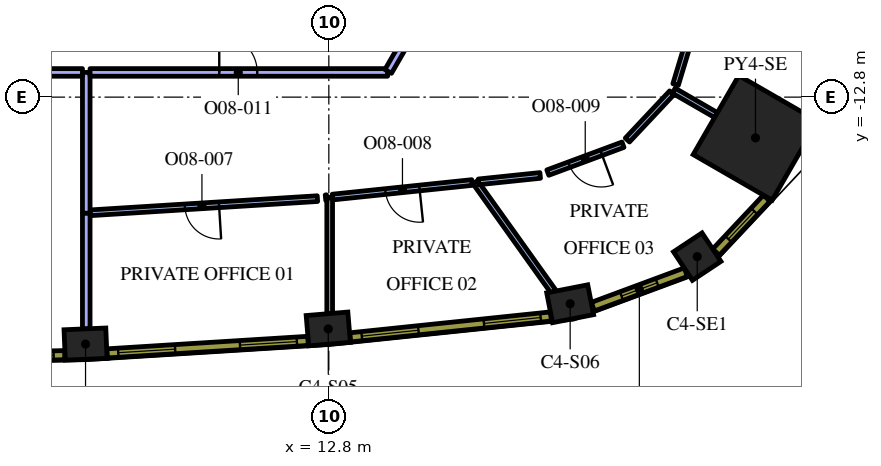
"""IFC4 building model, lengths in metres.
Left out: names, types, materials, properties, quantities, classifications, styles, units other than length and angle.
Written with IfcOpenShell. Run it as: python <this file> out.ifc"""

import sys

from ifc_helpers import new_model, si_unit, direction, frame, frame_2d, origin, origin_2d, place, context, subcontext, project, spatial, rectangle, extrude, element, fill, save


model = new_model("IFC4")
c1 = context("Model", 3, precision=1e-05, world=origin(), true_north=direction((0.0, 1.0)))
c2 = subcontext(c1, "Body", "Model", "MODEL_VIEW")
j1 = project(units=[si_unit("LENGTHUNIT", "METRE"), si_unit("PLANEANGLEUNIT", "RADIAN")], contexts=[c1])
p1 = place(None, origin())
s1 = spatial("IfcSite", under=j1, at=p1, CompositionType="ELEMENT")
p2 = place(p1, origin())
s2 = spatial("IfcBuilding", under=s1, at=p2, CompositionType="ELEMENT")
p3 = place(p2, frame((0.0, 0.0, 231.0)))
s3 = spatial("IfcBuildingStorey", under=s2, at=p3, CompositionType="ELEMENT", Elevation=231.0)
p4 = place(p3, frame((24.027, -13.872, 0.0), z_axis=(0.0, 0.0, 1.0), x_axis=(0.866025403784, -0.5, 0.0)))
e1 = element("IfcColumn", 1, at=p4, inside=s3, PredefinedType="COLUMN", context=c2, shape_type="SweptSolid", body=[
    extrude(rectangle(XDim=2.4, YDim=2.4, at=origin_2d()), origin(), (0.0, 0.0, 1.0), 4.2),
])
for number, where, z_axis, x_axis in (
    (2, (6.398, -19.298, 0.0), (0.0, 0.0, 1.0), (0.999, 0.041, 0.0)),
    (3, (12.785, -18.9, 0.0), (0.0, 0.0, 1.0), (0.997, 0.083, 0.0)),
    (4, (19.15, -18.237, 0.0), (0.0, 0.0, 1.0), (0.981, 0.192, 0.0)),
):
    element("IfcColumn", number, at=place(p3, frame(where, z_axis=z_axis, x_axis=x_axis)), inside=s3, PredefinedType="COLUMN", context=c2, shape_type="SweptSolid", body=[
        extrude(rectangle(XDim=1.1, YDim=0.8, at=origin_2d()), origin(), (0.0, 0.0, 1.0), 4.2),
    ])
p5 = place(p3, frame((22.494, -16.997, 0.0), z_axis=(0.0, 0.0, 1.0), x_axis=(0.833238868178, 0.552913183563, 0.0)))
e5 = element("IfcColumn", 5, at=p5, inside=s3, PredefinedType="COLUMN", context=c2, shape_type="SweptSolid", body=[
    extrude(rectangle(XDim=0.9, YDim=0.9, at=origin_2d()), origin(), (0.0, 0.0, 1.0), 4.2),
])
p6 = place(p3, frame((6.417, -15.846, 0.0), z_axis=(0.0, 0.0, 1.0), x_axis=(0.0, -1.0, 0.0)))
e6 = element("IfcWall", 6, at=p6, inside=s3, PredefinedType="PARTITIONING", context=c2, shape_type="SweptSolid", body=[
    extrude(rectangle(XDim=3.051, YDim=0.2, at=frame_2d((1.525, 0.0))), origin(), (0.0, 0.0, 1.0), 3.45),
])
p7 = place(p3, frame((6.417, -12.15, 0.0), z_axis=(0.0, 0.0, 1.0), x_axis=(0.0, -1.0, 0.0)))
e7 = element("IfcWall", 7, at=p7, inside=s3, PredefinedType="PARTITIONING", context=c2, shape_type="SweptSolid", body=[
    extrude(rectangle(XDim=3.704, YDim=0.2, at=frame_2d((1.852, 0.0))), origin(), (0.0, 0.0, 1.0), 3.45),
])
p8 = place(p3, frame((4.53, -12.15, 0.0), z_axis=(0.0, 0.0, 1.0), x_axis=(1.0, 0.0, 0.0)))
e8 = element("IfcWall", 8, at=p8, inside=s3, PredefinedType="PARTITIONING", context=c2, shape_type="SweptSolid", body=[
    extrude(rectangle(XDim=1.787, YDim=0.2, at=frame_2d((0.894, 0.0))), origin(), (0.0, 0.0, 1.0), 3.45),
])
p9 = place(p3, frame((12.823, -15.437, 0.0), z_axis=(0.0, 0.0, 1.0), x_axis=(0.0, -1.0, 0.0)))
e9 = element("IfcWall", 9, at=p9, inside=s3, PredefinedType="PARTITIONING", context=c2, shape_type="SweptSolid", body=[
    extrude(rectangle(XDim=3.058, YDim=0.15, at=frame_2d((1.529, 0.0))), origin(), (0.0, 0.0, 1.0), 3.45),
])
p10 = place(p3, frame((12.5, -15.471, 0.0), z_axis=(0.0, 0.0, 1.0), x_axis=(-0.998061916726, -0.0622286942, 0.0)))
e10 = element("IfcWall", 10, at=p10, inside=s3, PredefinedType="PARTITIONING", context=c2, shape_type="SweptSolid", body=[
    extrude(rectangle(XDim=5.995, YDim=0.15, at=frame_2d((2.998, 0.0))), origin(), (0.0, 0.0, 1.0), 3.45),
])
p11 = place(p10, frame((2.595, 0.0, 0.0)))
e11 = element("IfcOpeningElement", 11, at=p11, cuts=e10, PredefinedType="OPENING", context=c2, shape_type="SweptSolid", body=[
    extrude(rectangle(XDim=0.9, YDim=2.1, at=frame_2d((0.45, 1.05))), frame((0.0, 0.085, 0.0), z_axis=(0.0, -1.0, 0.0), x_axis=(1.0, 0.0, 0.0)), (0.0, 0.0, 1.0), 0.17),
])
p12 = place(p3, frame((12.713, -15.448, 0.0), z_axis=(0.0, 0.0, 1.0), x_axis=(0.995106821048, 0.098804932586, 0.0)))
e12 = element("IfcWall", 12, at=p12, inside=s3, PredefinedType="PARTITIONING", context=c2, shape_type="SweptSolid", body=[
    extrude(rectangle(XDim=0.035, YDim=0.15, at=frame_2d((0.017, 0.0))), origin(), (0.0, 0.0, 1.0), 3.45),
])
p13 = place(p3, frame((16.655, -15.038, 0.0), z_axis=(0.0, 0.0, 1.0), x_axis=(0.580996489012, -0.813906063226, 0.0)))
e13 = element("IfcWall", 13, at=p13, inside=s3, PredefinedType="PARTITIONING", context=c2, shape_type="SweptSolid", body=[
    extrude(rectangle(XDim=3.536, YDim=0.15, at=frame_2d((1.768, 0.0))), origin(), (0.0, 0.0, 1.0), 3.45),
])
p14 = place(p3, frame((16.569, -15.047, 0.0), z_axis=(0.0, 0.0, 1.0), x_axis=(-0.994621532294, -0.103576095197, 0.0)))
e14 = element("IfcWall", 14, at=p14, inside=s3, PredefinedType="PARTITIONING", context=c2, shape_type="SweptSolid", body=[
    extrude(rectangle(XDim=3.691, YDim=0.15, at=frame_2d((1.846, 0.0))), origin(), (0.0, 0.0, 1.0), 3.45),
])
p15 = place(p14, frame((1.391, 0.0, 0.0)))
e15 = element("IfcOpeningElement", 15, at=p15, cuts=e14, PredefinedType="OPENING", context=c2, shape_type="SweptSolid", body=[
    extrude(rectangle(XDim=0.9, YDim=2.1, at=frame_2d((0.45, 1.05))), frame((0.0, 0.085, 0.0), z_axis=(0.0, -1.0, 0.0), x_axis=(1.0, 0.0, 0.0)), (0.0, 0.0, 1.0), 0.17),
])
p16 = place(p3, frame((21.877, -12.63, 0.0), z_axis=(0.0, 0.0, 1.0), x_axis=(0.86599869919, -0.500046250861, 0.0)))
e16 = element("IfcWall", 16, at=p16, inside=s3, PredefinedType="PARTITIONING", context=c2, shape_type="SweptSolid", body=[
    extrude(rectangle(XDim=1.284, YDim=0.15, at=frame_2d((0.642, 0.0))), origin(), (0.0, 0.0, 1.0), 3.45),
])
p17 = place(p3, frame((16.74, -15.029, 0.0), z_axis=(0.0, 0.0, 1.0), x_axis=(0.994614871477, 0.103640037805, 0.0)))
e17 = element("IfcWall", 17, at=p17, inside=s3, PredefinedType="PARTITIONING", context=c2, shape_type="SweptSolid", body=[
    extrude(rectangle(XDim=1.63, YDim=0.15, at=frame_2d((0.815, 0.0))), origin(), (0.0, 0.0, 1.0), 3.45),
])
p18 = place(p3, frame((20.541, -14.052, 0.0), z_axis=(0.0, 0.0, 1.0), x_axis=(-0.937602119917, -0.347710029662, 0.0)))
e18 = element("IfcWall", 18, at=p18, inside=s3, PredefinedType="PARTITIONING", context=c2, shape_type="SweptSolid", body=[
    extrude(rectangle(XDim=2.11, YDim=0.15, at=frame_2d((1.055, 0.0))), origin(), (0.0, 0.0, 1.0), 3.45),
])
p19 = place(p18, frame((0.61, 0.0, 0.0)))
e19 = element("IfcOpeningElement", 19, at=p19, cuts=e18, PredefinedType="OPENING", context=c2, shape_type="SweptSolid", body=[
    extrude(rectangle(XDim=0.9, YDim=2.1, at=frame_2d((0.45, 1.05))), frame((0.0, 0.085, 0.0), z_axis=(0.0, -1.0, 0.0), x_axis=(1.0, 0.0, 0.0)), (0.0, 0.0, 1.0), 0.17),
])
p20 = place(p3, frame((20.656, -13.929, 0.0), z_axis=(0.0, 0.0, 1.0), x_axis=(0.684716940988, 0.728809104447, 0.0)))
e20 = element("IfcWall", 20, at=p20, inside=s3, PredefinedType="PARTITIONING", context=c2, shape_type="SweptSolid", body=[
    extrude(rectangle(XDim=1.705, YDim=0.15, at=frame_2d((0.853, 0.0))), origin(), (0.0, 0.0, 1.0), 3.45),
])
p21 = place(p3, frame((21.925, -12.469, 0.0), z_axis=(0.0, 0.0, 1.0), x_axis=(0.288767705809, 0.957399191603, 0.0)))
e21 = element("IfcWall", 21, at=p21, inside=s3, PredefinedType="PARTITIONING", context=c2, shape_type="SweptSolid", body=[
    extrude(rectangle(XDim=1.782, YDim=0.15, at=frame_2d((0.891, 0.0))), origin(), (0.0, 0.0, 1.0), 3.45),
])
p22 = place(p3, frame((6.517, -12.15, 0.0), z_axis=(0.0, 0.0, 1.0), x_axis=(1.0, 0.0, 0.0)))
e22 = element("IfcWall", 22, at=p22, inside=s3, PredefinedType="PARTITIONING", context=c2, shape_type="SweptSolid", body=[
    extrude(rectangle(XDim=7.83, YDim=0.2, at=frame_2d((3.915, 0.0))), origin(), (0.0, 0.0, 1.0), 3.45),
])
p23 = place(p22, frame((3.4, 0.0, 0.0)))
e23 = element("IfcOpeningElement", 23, at=p23, cuts=e22, PredefinedType="OPENING", context=c2, shape_type="SweptSolid", body=[
    extrude(rectangle(XDim=1.0, YDim=2.1, at=frame_2d((0.5, 1.05))), frame((0.0, 0.11, 0.0), z_axis=(0.0, -1.0, 0.0), x_axis=(1.0, 0.0, 0.0)), (0.0, 0.0, 1.0), 0.22),
])
p24 = place(p3, frame((14.362, -12.124, 0.0), z_axis=(0.0, 0.0, 1.0), x_axis=(0.500017005442, 0.866015585465, 0.0)))
e24 = element("IfcWall", 24, at=p24, inside=s3, PredefinedType="PARTITIONING", context=c2, shape_type="SweptSolid", body=[
    extrude(rectangle(XDim=6.338, YDim=0.2, at=frame_2d((3.169, 0.0))), origin(), (0.0, 0.0, 1.0), 3.45),
])
p25 = place(p3, frame((0.556, -19.699, 0.0), z_axis=(0.0, 0.0, 1.0), x_axis=(0.999784035184, 0.020781794712, 0.0)))
e25 = element("IfcWall", 25, at=p25, inside=s3, PredefinedType="SOLIDWALL", context=c2, shape_type="SweptSolid", body=[
    extrude(rectangle(XDim=5.298, YDim=0.24, at=frame_2d((2.649, 0.0))), origin(), (0.0, 0.0, 1.0), 3.95),
])
p26 = place(p25, frame((0.294, 0.0, 0.9)))
e26 = element("IfcOpeningElement", 26, at=p26, cuts=e25, PredefinedType="OPENING", context=c2, shape_type="SweptSolid", body=[
    extrude(rectangle(XDim=1.5, YDim=2.55, at=frame_2d((0.75, 1.275))), frame((0.0, 0.13, 0.0), z_axis=(0.0, -1.0, 0.0), x_axis=(1.0, 0.0, 0.0)), (0.0, 0.0, 1.0), 0.26),
])
p27 = place(p25, frame((3.504, 0.0, 0.9)))
e27 = element("IfcOpeningElement", 27, at=p27, cuts=e25, PredefinedType="OPENING", context=c2, shape_type="SweptSolid", body=[
    extrude(rectangle(XDim=1.5, YDim=2.55, at=frame_2d((0.75, 1.275))), frame((0.0, 0.13, 0.0), z_axis=(0.0, -1.0, 0.0), x_axis=(1.0, 0.0, 0.0)), (0.0, 0.0, 1.0), 0.26),
])
p28 = place(p3, frame((6.965, -19.543, 0.0), z_axis=(0.0, 0.0, 1.0), x_axis=(0.9980633213, 0.062206162685, 0.0)))
e28 = element("IfcWall", 28, at=p28, inside=s3, PredefinedType="SOLIDWALL", context=c2, shape_type="SweptSolid", body=[
    extrude(rectangle(XDim=5.298, YDim=0.24, at=frame_2d((2.649, 0.0))), origin(), (0.0, 0.0, 1.0), 3.95),
])
p29 = place(p28, frame((0.295, 0.0, 0.9)))
e29 = element("IfcOpeningElement", 29, at=p29, cuts=e28, PredefinedType="OPENING", context=c2, shape_type="SweptSolid", body=[
    extrude(rectangle(XDim=1.5, YDim=2.55, at=frame_2d((0.75, 1.275))), frame((0.0, 0.13, 0.0), z_axis=(0.0, -1.0, 0.0), x_axis=(1.0, 0.0, 0.0)), (0.0, 0.0, 1.0), 0.26),
])
p30 = place(p28, frame((3.504, 0.0, 0.9)))
e30 = element("IfcOpeningElement", 30, at=p30, cuts=e28, PredefinedType="OPENING", context=c2, shape_type="SweptSolid", body=[
    extrude(rectangle(XDim=1.5, YDim=2.55, at=frame_2d((0.75, 1.275))), frame((0.0, 0.13, 0.0), z_axis=(0.0, -1.0, 0.0), x_axis=(1.0, 0.0, 0.0)), (0.0, 0.0, 1.0), 0.26),
])
p31 = place(p3, frame((13.362, -19.121, 0.0), z_axis=(0.0, 0.0, 1.0), x_axis=(0.994621961215, 0.103571976272, 0.0)))
e31 = element("IfcWall", 31, at=p31, inside=s3, PredefinedType="SOLIDWALL", context=c2, shape_type="SweptSolid", body=[
    extrude(rectangle(XDim=5.311, YDim=0.24, at=frame_2d((2.655, 0.0))), origin(), (0.0, 0.0, 1.0), 3.95),
])
p32 = place(p31, frame((0.306, 0.0, 0.9)))
e32 = element("IfcOpeningElement", 32, at=p32, cuts=e31, PredefinedType="OPENING", context=c2, shape_type="SweptSolid", body=[
    extrude(rectangle(XDim=1.5, YDim=2.55, at=frame_2d((0.75, 1.275))), frame((0.0, 0.13, 0.0), z_axis=(0.0, -1.0, 0.0), x_axis=(1.0, 0.0, 0.0)), (0.0, 0.0, 1.0), 0.26),
])
p33 = place(p31, frame((3.539, 0.0, 0.9)))
e33 = element("IfcOpeningElement", 33, at=p33, cuts=e31, PredefinedType="OPENING", context=c2, shape_type="SweptSolid", body=[
    extrude(rectangle(XDim=1.5, YDim=2.55, at=frame_2d((0.75, 1.275))), frame((0.0, 0.13, 0.0), z_axis=(0.0, -1.0, 0.0), x_axis=(1.0, 0.0, 0.0)), (0.0, 0.0, 1.0), 0.26),
])
p34 = place(p3, frame((19.748, -18.314, 0.0), z_axis=(0.0, 0.0, 1.0), x_axis=(0.937569171184, 0.347798863203, 0.0)))
e34 = element("IfcWall", 34, at=p34, inside=s3, PredefinedType="SOLIDWALL", context=c2, shape_type="SweptSolid", body=[
    extrude(rectangle(XDim=2.609, YDim=0.24, at=frame_2d((1.305, 0.0))), origin(), (0.0, 0.0, 1.0), 3.95),
])
p35 = place(p34, frame((0.805, 0.0, 0.9)))
e35 = element("IfcOpeningElement", 35, at=p35, cuts=e34, PredefinedType="OPENING", context=c2, shape_type="SweptSolid", body=[
    extrude(rectangle(XDim=1.0, YDim=2.55, at=frame_2d((0.5, 1.275))), frame((0.0, 0.13, 0.0), z_axis=(0.0, -1.0, 0.0), x_axis=(1.0, 0.0, 0.0)), (0.0, 0.0, 1.0), 0.26),
])
p36 = place(p3, frame((22.989, -16.879, 0.0), z_axis=(0.0, 0.0, 1.0), x_axis=(0.684770274166, 0.728758994194, 0.0)))
e36 = element("IfcWall", 36, at=p36, inside=s3, PredefinedType="SOLIDWALL", context=c2, shape_type="SweptSolid", body=[
    extrude(rectangle(XDim=1.948, YDim=0.24, at=frame_2d((0.974, 0.0))), origin(), (0.0, 0.0, 1.0), 3.95),
])
p37 = place(p36, frame((0.474, 0.0, 0.9)))
e37 = element("IfcOpeningElement", 37, at=p37, cuts=e36, PredefinedType="OPENING", context=c2, shape_type="SweptSolid", body=[
    extrude(rectangle(XDim=1.0, YDim=2.55, at=frame_2d((0.5, 1.275))), frame((0.0, 0.13, 0.0), z_axis=(0.0, -1.0, 0.0), x_axis=(1.0, 0.0, 0.0)), (0.0, 0.0, 1.0), 0.26),
])
p38 = place(p11, origin())
e38 = element("IfcDoor", 38, at=p38, inside=s3, OperationType="SINGLE_SWING_RIGHT", PredefinedType="DOOR", context=c2, shape_type="SweptSolid", body=[
    extrude(rectangle(XDim=0.9, YDim=2.1, at=frame_2d((0.45, 1.05))), frame((0.0, 0.025, 0.0), z_axis=(0.0, -1.0, 0.0), x_axis=(1.0, 0.0, 0.0)), (0.0, 0.0, 1.0), 0.05),
])
fill(e11, e38)
p39 = place(p15, origin())
e39 = element("IfcDoor", 39, at=p39, inside=s3, OperationType="SINGLE_SWING_LEFT", PredefinedType="DOOR", context=c2, shape_type="SweptSolid", body=[
    extrude(rectangle(XDim=0.9, YDim=2.1, at=frame_2d((0.45, 1.05))), frame((0.0, 0.025, 0.0), z_axis=(0.0, -1.0, 0.0), x_axis=(1.0, 0.0, 0.0)), (0.0, 0.0, 1.0), 0.05),
])
fill(e15, e39)
p40 = place(p19, origin())
e40 = element("IfcDoor", 40, at=p40, inside=s3, OperationType="SINGLE_SWING_RIGHT", PredefinedType="DOOR", context=c2, shape_type="SweptSolid", body=[
    extrude(rectangle(XDim=0.9, YDim=2.1, at=frame_2d((0.45, 1.05))), frame((0.0, 0.025, 0.0), z_axis=(0.0, -1.0, 0.0), x_axis=(1.0, 0.0, 0.0)), (0.0, 0.0, 1.0), 0.05),
])
fill(e19, e40)
p41 = place(p23, origin())
e41 = element("IfcDoor", 41, at=p41, inside=s3, OperationType="SINGLE_SWING_LEFT", PredefinedType="DOOR", context=c2, shape_type="SweptSolid", body=[
    extrude(rectangle(XDim=1.0, YDim=2.1, at=frame_2d((0.5, 1.05))), frame((0.0, 0.025, 0.0), z_axis=(0.0, -1.0, 0.0), x_axis=(1.0, 0.0, 0.0)), (0.0, 0.0, 1.0), 0.05),
])
fill(e23, e41)
p42 = place(p27, origin())
e42 = element("IfcWindow", 42, at=p42, inside=s3, PartitioningType="SINGLE_PANEL", PredefinedType="WINDOW", context=c2, shape_type="SweptSolid", body=[
    extrude(rectangle(XDim=1.5, YDim=2.55, at=frame_2d((0.75, 1.275))), frame((0.0, 0.04, 0.0), z_axis=(0.0, -1.0, 0.0), x_axis=(1.0, 0.0, 0.0)), (0.0, 0.0, 1.0), 0.06),
])
fill(e27, e42)
p43 = place(p29, origin())
e43 = element("IfcWindow", 43, at=p43, inside=s3, PartitioningType="SINGLE_PANEL", PredefinedType="WINDOW", context=c2, shape_type="SweptSolid", body=[
    extrude(rectangle(XDim=1.5, YDim=2.55, at=frame_2d((0.75, 1.275))), frame((0.0, 0.04, 0.0), z_axis=(0.0, -1.0, 0.0), x_axis=(1.0, 0.0, 0.0)), (0.0, 0.0, 1.0), 0.06),
])
fill(e29, e43)
p44 = place(p30, origin())
e44 = element("IfcWindow", 44, at=p44, inside=s3, PartitioningType="SINGLE_PANEL", PredefinedType="WINDOW", context=c2, shape_type="SweptSolid", body=[
    extrude(rectangle(XDim=1.5, YDim=2.55, at=frame_2d((0.75, 1.275))), frame((0.0, 0.04, 0.0), z_axis=(0.0, -1.0, 0.0), x_axis=(1.0, 0.0, 0.0)), (0.0, 0.0, 1.0), 0.06),
])
fill(e30, e44)
p45 = place(p32, origin())
e45 = element("IfcWindow", 45, at=p45, inside=s3, PartitioningType="SINGLE_PANEL", PredefinedType="WINDOW", context=c2, shape_type="SweptSolid", body=[
    extrude(rectangle(XDim=1.5, YDim=2.55, at=frame_2d((0.75, 1.275))), frame((0.0, 0.04, 0.0), z_axis=(0.0, -1.0, 0.0), x_axis=(1.0, 0.0, 0.0)), (0.0, 0.0, 1.0), 0.06),
])
fill(e32, e45)
p46 = place(p33, origin())
e46 = element("IfcWindow", 46, at=p46, inside=s3, PartitioningType="SINGLE_PANEL", PredefinedType="WINDOW", context=c2, shape_type="SweptSolid", body=[
    extrude(rectangle(XDim=1.5, YDim=2.55, at=frame_2d((0.75, 1.275))), frame((0.0, 0.04, 0.0), z_axis=(0.0, -1.0, 0.0), x_axis=(1.0, 0.0, 0.0)), (0.0, 0.0, 1.0), 0.06),
])
fill(e33, e46)
p47 = place(p35, origin())
e47 = element("IfcWindow", 47, at=p47, inside=s3, PartitioningType="SINGLE_PANEL", PredefinedType="WINDOW", context=c2, shape_type="SweptSolid", body=[
    extrude(rectangle(XDim=1.0, YDim=2.55, at=frame_2d((0.5, 1.275))), frame((0.0, 0.04, 0.0), z_axis=(0.0, -1.0, 0.0), x_axis=(1.0, 0.0, 0.0)), (0.0, 0.0, 1.0), 0.06),
])
fill(e35, e47)
p48 = place(p37, origin())
e48 = element("IfcWindow", 48, at=p48, inside=s3, PartitioningType="SINGLE_PANEL", PredefinedType="WINDOW", context=c2, shape_type="SweptSolid", body=[
    extrude(rectangle(XDim=1.0, YDim=2.55, at=frame_2d((0.5, 1.275))), frame((0.0, 0.04, 0.0), z_axis=(0.0, -1.0, 0.0), x_axis=(1.0, 0.0, 0.0)), (0.0, 0.0, 1.0), 0.06),
])
fill(e37, e48)
save(model, sys.argv[1])
